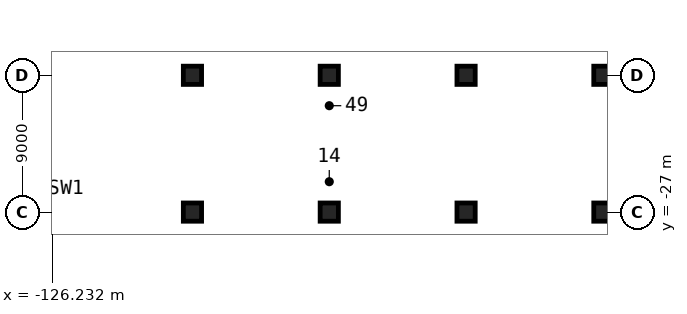
"""IFC4 building model, lengths in metres.
Left out: names, types, materials, properties, quantities, classifications, styles, units other than length and angle.
Written with IfcOpenShell. Run it as: python <this file> out.ifc"""

import sys

from ifc_helpers import new_model, si_unit, direction, frame, origin, origin_2d, place, context, subcontext, project, spatial, rectangle, extrude, element, save


model = new_model("IFC4")
c1 = context("Model", 3, precision=1e-05, world=origin(), true_north=direction((0.0, 1.0)))
c2 = subcontext(c1, "Body", "Model", "MODEL_VIEW")
j1 = project(units=[si_unit("LENGTHUNIT", "METRE"), si_unit("PLANEANGLEUNIT", "RADIAN")], contexts=[c1])
p1 = place(None, origin())
s1 = spatial("IfcSite", under=j1, at=p1, CompositionType="ELEMENT")
p2 = place(p1, origin())
s2 = spatial("IfcBuilding", under=s1, at=p2, CompositionType="ELEMENT")
p3 = place(p2, frame((0.0, 0.0, -9.0)))
s3 = spatial("IfcBuildingStorey", under=s2, at=p3, CompositionType="ELEMENT", Elevation=-9.0)
for number, where, z_axis, x_axis in (
    (1, (-117.0, -27.0, 0.0), (0.0, 0.0, 1.0), (1.0, 0.0, 0.0)),
    (2, (-117.0, -18.0, 0.0), (0.0, 0.0, 1.0), (1.0, 0.0, 0.0)),
    (3, (-108.0, -27.0, 0.0), (0.0, 0.0, 1.0), (1.0, 0.0, 0.0)),
    (4, (-108.0, -18.0, 0.0), (0.0, 0.0, 1.0), (1.0, 0.0, 0.0)),
    (5, (-99.0, -27.0, 0.0), (0.0, 0.0, 1.0), (1.0, 0.0, 0.0)),
    (6, (-99.0, -18.0, 0.0), (0.0, 0.0, 1.0), (1.0, 0.0, 0.0)),
    (7, (-90.0, -27.0, 0.0), (0.0, 0.0, 1.0), (1.0, 0.0, 0.0)),
    (8, (-90.0, -18.0, 0.0), (0.0, 0.0, 1.0), (1.0, 0.0, 0.0)),
):
    element("IfcColumn", number, at=place(p3, frame(where, z_axis=z_axis, x_axis=x_axis)), inside=s3, PredefinedType="COLUMN", context=c2, shape_type="SweptSolid", body=[
        extrude(rectangle(XDim=1.2, YDim=1.2, at=origin_2d()), origin(), (0.0, 0.0, 1.0), 4.5),
    ])
save(model, sys.argv[1])
